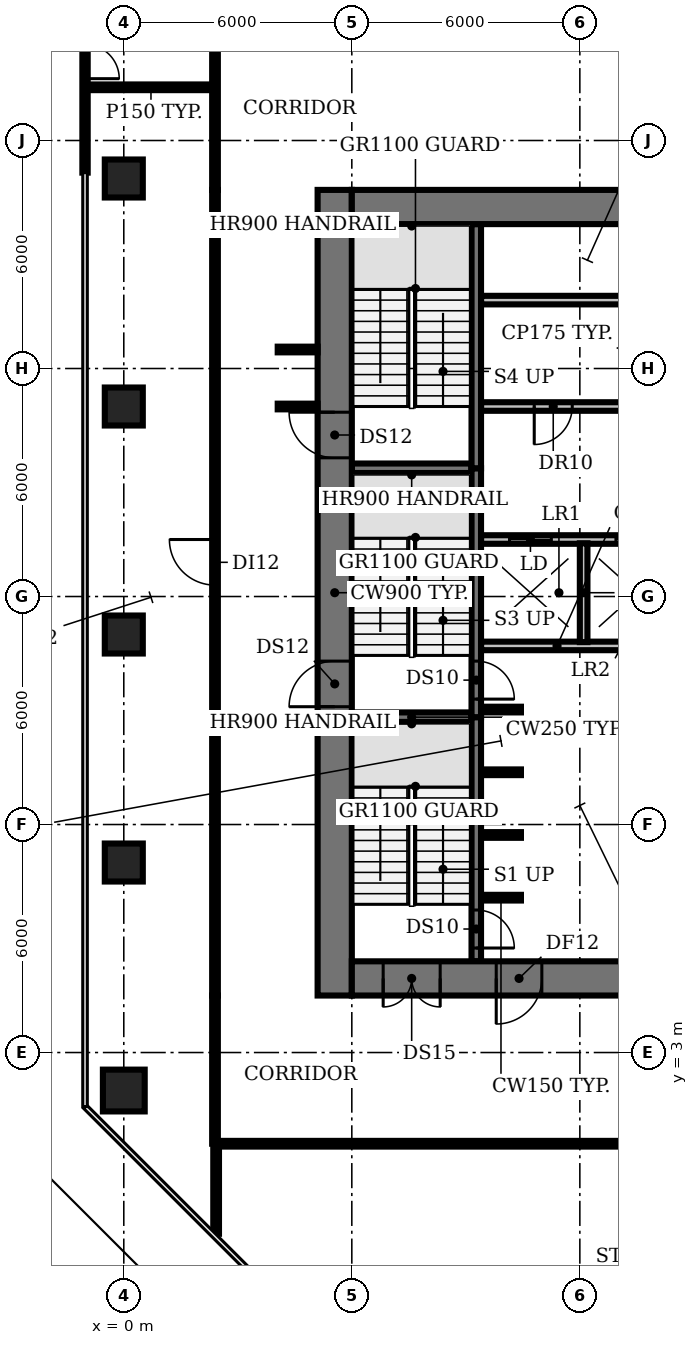
"""IFC4 building model, lengths in metres.
Left out: names, types, materials, properties, quantities, classifications, styles, units other than length and angle.
Written with IfcOpenShell. Run it as: python <this file> out.ifc"""

import sys

from ifc_helpers import new_model, si_unit, direction, frame, frame_2d, origin, origin_2d, place, context, subcontext, project, spatial, rectangle, circle, extrude, element, fill, save


model = new_model("IFC4")
c1 = context("Model", 3, precision=1e-05, world=origin(), true_north=direction((0.0, 1.0)))
c2 = subcontext(c1, "Body", "Model", "MODEL_VIEW")
j1 = project(units=[si_unit("LENGTHUNIT", "METRE"), si_unit("PLANEANGLEUNIT", "RADIAN")], contexts=[c1])
p1 = place(None, origin())
s1 = spatial("IfcSite", under=j1, at=p1, CompositionType="ELEMENT")
p2 = place(p1, origin())
s2 = spatial("IfcBuilding", under=s1, at=p2, CompositionType="ELEMENT")
p3 = place(p2, frame((0.0, 0.0, 11.0)))
s3 = spatial("IfcBuildingStorey", under=s2, at=p3, CompositionType="ELEMENT", Elevation=11.0)
p4 = place(p3, frame((0.0, 2.0, 0.0), z_axis=(0.0, 0.0, 1.0), x_axis=(1.0, 0.0, 0.0)))
e1 = element("IfcColumn", 1, at=p4, inside=s3, PredefinedType="COLUMN", context=c2, shape_type="SweptSolid", body=[
    extrude(circle(Radius=0.55, at=origin_2d()), origin(), (0.0, 0.0, 1.0), 4.15),
])
for number, where, z_axis, x_axis in (
    (2, (0.0, 8.0, 0.0), (0.0, 0.0, 1.0), (1.0, 0.0, 0.0)),
    (3, (0.0, 14.0, 0.0), (0.0, 0.0, 1.0), (1.0, 0.0, 0.0)),
    (4, (0.0, 20.0, 0.0), (0.0, 0.0, 1.0), (1.0, 0.0, 0.0)),
    (5, (0.0, 26.0, 0.0), (0.0, 0.0, 1.0), (1.0, 0.0, 0.0)),
):
    element("IfcColumn", number, at=place(p3, frame(where, z_axis=z_axis, x_axis=x_axis)), inside=s3, PredefinedType="COLUMN", context=c2, shape_type="SweptSolid", body=[
        extrude(rectangle(XDim=1.0, YDim=1.0, at=origin_2d()), origin(), (0.0, 0.0, 1.0), 4.15),
    ])
p5 = place(p3, frame((-1.02, 32.299, 0.0), z_axis=(0.0, 0.0, 1.0), x_axis=(0.0, -1.0, 0.0)))
e6 = element("IfcWall", 6, at=p5, inside=s3, PredefinedType="SOLIDWALL", context=c2, shape_type="SweptSolid", body=[
    extrude(rectangle(XDim=6.144, YDim=0.14, at=frame_2d((3.072, 0.0))), origin(), (0.0, 0.0, 1.0), 4.15),
])
p6 = place(p5, frame((1.872, 0.0, 0.0)))
e7 = element("IfcOpeningElement", 7, at=p6, cuts=e6, PredefinedType="OPENING", context=c2, shape_type="SweptSolid", body=[
    extrude(rectangle(XDim=1.8, YDim=2.4, at=frame_2d((0.9, 1.2))), frame((0.0, 0.08, 0.0), z_axis=(0.0, -1.0, 0.0), x_axis=(1.0, 0.0, 0.0)), (0.0, 0.0, 1.0), 0.16),
])
for number, where, z_axis, x_axis in (
    (8, (9.4, 7.075, 0.0), (0.0, 0.0, 1.0), (1.0, 0.0, 0.0)),
    (9, (9.4, 8.725, 0.0), (0.0, 0.0, 1.0), (1.0, 0.0, 0.0)),
    (10, (9.4, 10.375, 0.0), (0.0, 0.0, 1.0), (1.0, 0.0, 0.0)),
):
    element("IfcWall", number, at=place(p3, frame(where, z_axis=z_axis, x_axis=x_axis)), inside=s3, PredefinedType="SHEAR", context=c2, shape_type="SweptSolid", body=[
        extrude(rectangle(XDim=1.05, YDim=0.15, at=frame_2d((0.525, 0.0))), origin(), (0.0, 0.0, 1.0), 4.15),
    ])
p7 = place(p3, frame((6.0, 11.825, 0.0), z_axis=(0.0, 0.0, 1.0), x_axis=(1.0, 0.0, 0.0)))
e11 = element("IfcWall", 11, at=p7, inside=s3, PredefinedType="SHEAR", context=c2, shape_type="SweptSolid", body=[
    extrude(rectangle(XDim=3.15, YDim=0.25, at=frame_2d((1.575, 0.0))), origin(), (0.0, 0.0, 1.0), 4.15),
])
p8 = place(p3, frame((9.4, 12.025, 0.0), z_axis=(0.0, 0.0, 1.0), x_axis=(1.0, 0.0, 0.0)))
e12 = element("IfcWall", 12, at=p8, inside=s3, PredefinedType="SHEAR", context=c2, shape_type="SweptSolid", body=[
    extrude(rectangle(XDim=1.05, YDim=0.15, at=frame_2d((0.525, 0.0))), origin(), (0.0, 0.0, 1.0), 4.15),
])
p9 = place(p3, frame((9.4, 13.7, 0.0), z_axis=(0.0, 0.0, 1.0), x_axis=(1.0, 0.0, 0.0)))
e13 = element("IfcWall", 13, at=p9, inside=s3, PredefinedType="PARTITIONING", context=c2, shape_type="SweptSolid", body=[
    extrude(rectangle(XDim=4.0, YDim=0.225, at=frame_2d((2.0, 0.0))), origin(), (0.0, 0.0, 1.0), 4.15),
])
p10 = place(p3, frame((9.4, 16.5, 0.0), z_axis=(0.0, 0.0, 1.0), x_axis=(1.0, 0.0, 0.0)))
e14 = element("IfcWall", 14, at=p10, inside=s3, PredefinedType="PARTITIONING", context=c2, shape_type="SweptSolid", body=[
    extrude(rectangle(XDim=14.6, YDim=0.225, at=frame_2d((7.3, 0.0))), origin(), (0.0, 0.0, 1.0), 4.15),
])
p11 = place(p10, frame((0.75, 0.0, 0.0)))
e15 = element("IfcOpeningElement", 15, at=p11, cuts=e14, PredefinedType="OPENING", context=c2, shape_type="SweptSolid", body=[
    extrude(rectangle(XDim=1.1, YDim=2.1, at=frame_2d((0.55, 1.05))), frame((0.0, 0.123, 0.0), z_axis=(0.0, -1.0, 0.0), x_axis=(1.0, 0.0, 0.0)), (0.0, 0.0, 1.0), 0.245),
])
p12 = place(p10, frame((3.55, 0.0, 0.0)))
e16 = element("IfcOpeningElement", 16, at=p12, cuts=e14, PredefinedType="OPENING", context=c2, shape_type="SweptSolid", body=[
    extrude(rectangle(XDim=1.1, YDim=2.1, at=frame_2d((0.55, 1.05))), frame((0.0, 0.123, 0.0), z_axis=(0.0, -1.0, 0.0), x_axis=(1.0, 0.0, 0.0)), (0.0, 0.0, 1.0), 0.245),
])
p13 = place(p10, frame((6.35, 0.0, 0.0)))
e17 = element("IfcOpeningElement", 17, at=p13, cuts=e14, PredefinedType="OPENING", context=c2, shape_type="SweptSolid", body=[
    extrude(rectangle(XDim=1.1, YDim=2.1, at=frame_2d((0.55, 1.05))), frame((0.0, 0.123, 0.0), z_axis=(0.0, -1.0, 0.0), x_axis=(1.0, 0.0, 0.0)), (0.0, 0.0, 1.0), 0.245),
])
p14 = place(p10, frame((9.15, 0.0, 0.0)))
e18 = element("IfcOpeningElement", 18, at=p14, cuts=e14, PredefinedType="OPENING", context=c2, shape_type="SweptSolid", body=[
    extrude(rectangle(XDim=1.1, YDim=2.1, at=frame_2d((0.55, 1.05))), frame((0.0, 0.123, 0.0), z_axis=(0.0, -1.0, 0.0), x_axis=(1.0, 0.0, 0.0)), (0.0, 0.0, 1.0), 0.245),
])
p15 = place(p10, frame((12.4, 0.0, 0.0)))
e19 = element("IfcOpeningElement", 19, at=p15, cuts=e14, PredefinedType="OPENING", context=c2, shape_type="SweptSolid", body=[
    extrude(rectangle(XDim=1.0, YDim=2.1, at=frame_2d((0.5, 1.05))), frame((0.0, 0.123, 0.0), z_axis=(0.0, -1.0, 0.0), x_axis=(1.0, 0.0, 0.0)), (0.0, 0.0, 1.0), 0.245),
])
p16 = place(p3, frame((6.0, 18.375, 0.0), z_axis=(0.0, 0.0, 1.0), x_axis=(1.0, 0.0, 0.0)))
e20 = element("IfcWall", 20, at=p16, inside=s3, PredefinedType="SHEAR", context=c2, shape_type="SweptSolid", body=[
    extrude(rectangle(XDim=3.15, YDim=0.25, at=frame_2d((1.575, 0.0))), origin(), (0.0, 0.0, 1.0), 4.15),
])
p17 = place(p3, frame((24.0, 20.0, 0.0), z_axis=(0.0, 0.0, 1.0), x_axis=(-1.0, 0.0, 0.0)))
e21 = element("IfcWall", 21, at=p17, inside=s3, PredefinedType="PARTITIONING", context=c2, shape_type="SweptSolid", body=[
    extrude(rectangle(XDim=14.6, YDim=0.225, at=frame_2d((7.3, 0.0))), origin(), (0.0, 0.0, 1.0), 4.15),
])
p18 = place(p17, frame((12.2, 0.0, 0.0)))
e22 = element("IfcOpeningElement", 22, at=p18, cuts=e21, PredefinedType="OPENING", context=c2, shape_type="SweptSolid", body=[
    extrude(rectangle(XDim=1.0, YDim=2.1, at=frame_2d((0.5, 1.05))), frame((0.0, 0.123, 0.0), z_axis=(0.0, -1.0, 0.0), x_axis=(1.0, 0.0, 0.0)), (0.0, 0.0, 1.0), 0.245),
])
p19 = place(p17, frame((9.025, 0.0, 0.0)))
e23 = element("IfcOpeningElement", 23, at=p19, cuts=e21, PredefinedType="OPENING", context=c2, shape_type="SweptSolid", body=[
    extrude(rectangle(XDim=0.9, YDim=2.1, at=frame_2d((0.45, 1.05))), frame((0.0, 0.123, 0.0), z_axis=(0.0, -1.0, 0.0), x_axis=(1.0, 0.0, 0.0)), (0.0, 0.0, 1.0), 0.245),
])
p20 = place(p17, frame((5.375, 0.0, 0.0)))
e24 = element("IfcOpeningElement", 24, at=p20, cuts=e21, PredefinedType="OPENING", context=c2, shape_type="SweptSolid", body=[
    extrude(rectangle(XDim=1.0, YDim=2.1, at=frame_2d((0.5, 1.05))), frame((0.0, 0.123, 0.0), z_axis=(0.0, -1.0, 0.0), x_axis=(1.0, 0.0, 0.0)), (0.0, 0.0, 1.0), 0.245),
])
p21 = place(p17, frame((1.2, 0.0, 0.0)))
e25 = element("IfcOpeningElement", 25, at=p21, cuts=e21, PredefinedType="OPENING", context=c2, shape_type="SweptSolid", body=[
    extrude(rectangle(XDim=1.0, YDim=2.1, at=frame_2d((0.5, 1.05))), frame((0.0, 0.123, 0.0), z_axis=(0.0, -1.0, 0.0), x_axis=(1.0, 0.0, 0.0)), (0.0, 0.0, 1.0), 0.245),
])
p22 = place(p3, frame((9.4, 22.8, 0.0), z_axis=(0.0, 0.0, 1.0), x_axis=(1.0, 0.0, 0.0)))
e26 = element("IfcWall", 26, at=p22, inside=s3, PredefinedType="PARTITIONING", context=c2, shape_type="SweptSolid", body=[
    extrude(rectangle(XDim=14.6, YDim=0.225, at=frame_2d((7.3, 0.0))), origin(), (0.0, 0.0, 1.0), 4.15),
])
p23 = place(p3, frame((9.275, 11.825, 0.0), z_axis=(0.0, 0.0, 1.0), x_axis=(0.0, -1.0, 0.0)))
e27 = element("IfcWall", 27, at=p23, inside=s3, PredefinedType="SHEAR", context=c2, shape_type="SweptSolid", body=[
    extrude(rectangle(XDim=6.425, YDim=0.25, at=frame_2d((3.212, 0.0))), origin(), (0.0, 0.0, 1.0), 4.15),
])
p24 = place(p23, frame((5.075, 0.0, 0.0)))
e28 = element("IfcOpeningElement", 28, at=p24, cuts=e27, PredefinedType="OPENING", context=c2, shape_type="SweptSolid", body=[
    extrude(rectangle(XDim=1.0, YDim=2.1, at=frame_2d((0.5, 1.05))), frame((0.0, 0.135, 0.0), z_axis=(0.0, -1.0, 0.0), x_axis=(1.0, 0.0, 0.0)), (0.0, 0.0, 1.0), 0.27),
])
p25 = place(p3, frame((9.275, 18.375, 0.0), z_axis=(0.0, 0.0, 1.0), x_axis=(0.0, -1.0, 0.0)))
e29 = element("IfcWall", 29, at=p25, inside=s3, PredefinedType="SHEAR", context=c2, shape_type="SweptSolid", body=[
    extrude(rectangle(XDim=6.55, YDim=0.25, at=frame_2d((3.275, 0.0))), origin(), (0.0, 0.0, 1.0), 4.15),
])
p26 = place(p25, frame((5.075, 0.0, 0.0)))
e30 = element("IfcOpeningElement", 30, at=p26, cuts=e29, PredefinedType="OPENING", context=c2, shape_type="SweptSolid", body=[
    extrude(rectangle(XDim=1.0, YDim=2.1, at=frame_2d((0.5, 1.05))), frame((0.0, 0.135, 0.0), z_axis=(0.0, -1.0, 0.0), x_axis=(1.0, 0.0, 0.0)), (0.0, 0.0, 1.0), 0.27),
])
p27 = place(p3, frame((9.275, 18.375, 0.0), z_axis=(0.0, 0.0, 1.0), x_axis=(0.0, 1.0, 0.0)))
e31 = element("IfcWall", 31, at=p27, inside=s3, PredefinedType="SHEAR", context=c2, shape_type="SweptSolid", body=[
    extrude(rectangle(XDim=6.425, YDim=0.25, at=frame_2d((3.212, 0.0))), origin(), (0.0, 0.0, 1.0), 4.15),
])
p28 = place(p3, frame((12.1, 13.8, 0.0), z_axis=(0.0, 0.0, 1.0), x_axis=(0.0, 1.0, 0.0)))
e32 = element("IfcWall", 32, at=p28, inside=s3, PredefinedType="SOLIDWALL", context=c2, shape_type="SweptSolid", body=[
    extrude(rectangle(XDim=2.6, YDim=0.2, at=frame_2d((1.3, 0.0))), origin(), (0.0, 0.0, 1.0), 4.15),
])
p29 = place(p3, frame((5.55, 4.5, 0.0), z_axis=(0.0, 0.0, 1.0), x_axis=(0.0, 1.0, 0.0)))
e33 = element("IfcWall", 33, at=p29, inside=s3, PredefinedType="SHEAR", context=c2, shape_type="SweptSolid", body=[
    extrude(rectangle(XDim=21.2, YDim=0.9, at=frame_2d((10.6, 0.0))), origin(), (0.0, 0.0, 1.0), 4.15),
])
p30 = place(p29, frame((7.6, 0.0, 0.0)))
e34 = element("IfcOpeningElement", 34, at=p30, cuts=e33, PredefinedType="OPENING", context=c2, shape_type="SweptSolid", body=[
    extrude(rectangle(XDim=1.2, YDim=2.1, at=frame_2d((0.6, 1.05))), frame((0.0, 0.46, 0.0), z_axis=(0.0, -1.0, 0.0), x_axis=(1.0, 0.0, 0.0)), (0.0, 0.0, 1.0), 0.92),
])
p31 = place(p29, frame((14.15, 0.0, 0.0)))
e35 = element("IfcOpeningElement", 35, at=p31, cuts=e33, PredefinedType="OPENING", context=c2, shape_type="SweptSolid", body=[
    extrude(rectangle(XDim=1.2, YDim=2.1, at=frame_2d((0.6, 1.05))), frame((0.0, 0.46, 0.0), z_axis=(0.0, -1.0, 0.0), x_axis=(1.0, 0.0, 0.0)), (0.0, 0.0, 1.0), 0.92),
])
p32 = place(p3, frame((24.0, 4.95, 0.0), z_axis=(0.0, 0.0, 1.0), x_axis=(-1.0, 0.0, 0.0)))
e36 = element("IfcWall", 36, at=p32, inside=s3, PredefinedType="SHEAR", context=c2, shape_type="SweptSolid", body=[
    extrude(rectangle(XDim=18.0, YDim=0.9, at=frame_2d((9.0, 0.0))), origin(), (0.0, 0.0, 1.0), 4.15),
])
p33 = place(p32, frame((15.675, 0.0, 0.0)))
e37 = element("IfcOpeningElement", 37, at=p33, cuts=e36, PredefinedType="OPENING", context=c2, shape_type="SweptSolid", body=[
    extrude(rectangle(XDim=1.5, YDim=2.1, at=frame_2d((0.75, 1.05))), frame((0.0, 0.46, 0.0), z_axis=(0.0, -1.0, 0.0), x_axis=(1.0, 0.0, 0.0)), (0.0, 0.0, 1.0), 0.92),
])
p34 = place(p32, frame((0.825, 0.0, 0.0)))
e38 = element("IfcOpeningElement", 38, at=p34, cuts=e36, PredefinedType="OPENING", context=c2, shape_type="SweptSolid", body=[
    extrude(rectangle(XDim=1.5, YDim=2.1, at=frame_2d((0.75, 1.05))), frame((0.0, 0.46, 0.0), z_axis=(0.0, -1.0, 0.0), x_axis=(1.0, 0.0, 0.0)), (0.0, 0.0, 1.0), 0.92),
])
p35 = place(p32, frame((13.0, 0.0, 0.0)))
e39 = element("IfcOpeningElement", 39, at=p35, cuts=e36, PredefinedType="OPENING", context=c2, shape_type="SweptSolid", body=[
    extrude(rectangle(XDim=1.2, YDim=2.1, at=frame_2d((0.6, 1.05))), frame((0.0, 0.46, 0.0), z_axis=(0.0, -1.0, 0.0), x_axis=(1.0, 0.0, 0.0)), (0.0, 0.0, 1.0), 0.92),
])
p36 = place(p32, frame((4.9, 0.0, 0.0)))
e40 = element("IfcOpeningElement", 40, at=p36, cuts=e36, PredefinedType="OPENING", context=c2, shape_type="SweptSolid", body=[
    extrude(rectangle(XDim=1.0, YDim=2.1, at=frame_2d((0.5, 1.05))), frame((0.0, 0.46, 0.0), z_axis=(0.0, -1.0, 0.0), x_axis=(1.0, 0.0, 0.0)), (0.0, 0.0, 1.0), 0.92),
])
p37 = place(p3, frame((6.0, 25.25, 0.0), z_axis=(0.0, 0.0, 1.0), x_axis=(1.0, 0.0, 0.0)))
e41 = element("IfcWall", 41, at=p37, inside=s3, PredefinedType="SHEAR", context=c2, shape_type="SweptSolid", body=[
    extrude(rectangle(XDim=18.0, YDim=0.9, at=frame_2d((9.0, 0.0))), origin(), (0.0, 0.0, 1.0), 4.15),
])
p38 = place(p3, frame((-0.97, 28.4, 0.0), z_axis=(0.0, 0.0, 1.0), x_axis=(1.0, 0.0, 0.0)))
e42 = element("IfcWall", 42, at=p38, inside=s3, PredefinedType="PARTITIONING", context=c2, shape_type="SweptSolid", body=[
    extrude(rectangle(XDim=3.37, YDim=0.15, at=frame_2d((1.685, 0.0))), origin(), (0.0, 0.0, 1.0), 3.08),
])
p39 = place(p3, frame((2.4, 0.6, 0.0), z_axis=(0.0, 0.0, 1.0), x_axis=(0.0, 1.0, 0.0)))
e43 = element("IfcWall", 43, at=p39, inside=s3, PredefinedType="PARTITIONING", context=c2, shape_type="SweptSolid", body=[
    extrude(rectangle(XDim=3.9, YDim=0.15, at=frame_2d((1.95, 0.0))), origin(), (0.0, 0.0, 1.0), 3.08),
])
p40 = place(p3, frame((2.4, 4.5, 0.0), z_axis=(0.0, 0.0, 1.0), x_axis=(0.0, 1.0, 0.0)))
e44 = element("IfcWall", 44, at=p40, inside=s3, PredefinedType="PARTITIONING", context=c2, shape_type="SweptSolid", body=[
    extrude(rectangle(XDim=21.2, YDim=0.15, at=frame_2d((10.6, 0.0))), origin(), (0.0, 0.0, 1.0), 3.08),
])
p41 = place(p40, frame((10.8, 0.0, 0.0)))
e45 = element("IfcOpeningElement", 45, at=p41, cuts=e44, PredefinedType="OPENING", context=c2, shape_type="SweptSolid", body=[
    extrude(rectangle(XDim=1.2, YDim=2.1, at=frame_2d((0.6, 1.05))), frame((0.0, 0.085, 0.0), z_axis=(0.0, -1.0, 0.0), x_axis=(1.0, 0.0, 0.0)), (0.0, 0.0, 1.0), 0.17),
])
p42 = place(p3, frame((2.4, 25.7, 0.0), z_axis=(0.0, 0.0, 1.0), x_axis=(0.0, 1.0, 0.0)))
e46 = element("IfcWall", 46, at=p42, inside=s3, PredefinedType="PARTITIONING", context=c2, shape_type="SweptSolid", body=[
    extrude(rectangle(XDim=3.9, YDim=0.15, at=frame_2d((1.95, 0.0))), origin(), (0.0, 0.0, 1.0), 3.08),
])
p43 = place(p3, frame((2.43, -1.77, 0.0), z_axis=(0.0, 0.0, 1.0), x_axis=(0.0, 1.0, 0.0)))
e47 = element("IfcWall", 47, at=p43, inside=s3, PredefinedType="PARTITIONING", context=c2, shape_type="SweptSolid", body=[
    extrude(rectangle(XDim=2.37, YDim=0.15, at=frame_2d((1.185, 0.0))), origin(), (0.0, 0.0, 1.0), 3.08),
])
for number, where, z_axis, x_axis in (
    (48, (4.05, 20.0, 0.0), (0.0, 0.0, 1.0), (1.0, 0.0, 0.0)),
    (49, (4.05, 21.5, 0.0), (0.0, 0.0, 1.0), (1.0, 0.0, 0.0)),
):
    element("IfcWall", number, at=place(p3, frame(where, z_axis=z_axis, x_axis=x_axis)), inside=s3, PredefinedType="PARTITIONING", context=c2, shape_type="SweptSolid", body=[
        extrude(rectangle(XDim=1.05, YDim=0.15, at=frame_2d((0.525, 0.0))), origin(), (0.0, 0.0, 1.0), 3.08),
    ])
p44 = place(p3, frame((27.6, 0.6, 0.0), z_axis=(0.0, 0.0, 1.0), x_axis=(-1.0, 0.0, 0.0)))
e50 = element("IfcWall", 50, at=p44, inside=s3, PredefinedType="PARTITIONING", context=c2, shape_type="SweptSolid", body=[
    extrude(rectangle(XDim=25.2, YDim=0.15, at=frame_2d((12.6, 0.0))), origin(), (0.0, 0.0, 1.0), 3.08),
])
p45 = place(p44, frame((12.1, 0.0, 0.0)))
e51 = element("IfcOpeningElement", 51, at=p45, cuts=e50, PredefinedType="OPENING", context=c2, shape_type="SweptSolid", body=[
    extrude(rectangle(XDim=1.2, YDim=2.1, at=frame_2d((0.6, 1.05))), frame((0.0, 0.085, 0.0), z_axis=(0.0, -1.0, 0.0), x_axis=(1.0, 0.0, 0.0)), (0.0, 0.0, 1.0), 0.17),
])
p46 = place(p6, origin())
e52 = element("IfcDoor", 52, at=p46, inside=s3, OperationType="DOUBLE_DOOR_DOUBLE_SWING", PredefinedType="DOOR", context=c2, shape_type="SweptSolid", body=[
    extrude(rectangle(XDim=1.8, YDim=2.4, at=frame_2d((0.9, 1.2))), frame((0.0, 0.025, 0.0), z_axis=(0.0, -1.0, 0.0), x_axis=(1.0, 0.0, 0.0)), (0.0, 0.0, 1.0), 0.05),
])
fill(e7, e52)
p47 = place(p11, origin())
e53 = element("IfcDoor", 53, at=p47, inside=s3, OperationType="DOUBLE_DOOR_SLIDING", PredefinedType="DOOR", context=c2, shape_type="SweptSolid", body=[
    extrude(rectangle(XDim=1.1, YDim=2.1, at=frame_2d((0.55, 1.05))), frame((0.0, 0.025, 0.0), z_axis=(0.0, -1.0, 0.0), x_axis=(1.0, 0.0, 0.0)), (0.0, 0.0, 1.0), 0.05),
])
fill(e15, e53)
p48 = place(p12, origin())
e54 = element("IfcDoor", 54, at=p48, inside=s3, OperationType="DOUBLE_DOOR_SLIDING", PredefinedType="DOOR", context=c2, shape_type="SweptSolid", body=[
    extrude(rectangle(XDim=1.1, YDim=2.1, at=frame_2d((0.55, 1.05))), frame((0.0, 0.025, 0.0), z_axis=(0.0, -1.0, 0.0), x_axis=(1.0, 0.0, 0.0)), (0.0, 0.0, 1.0), 0.05),
])
fill(e16, e54)
p49 = place(p18, origin())
e55 = element("IfcDoor", 55, at=p49, inside=s3, OperationType="SINGLE_SWING_RIGHT", PredefinedType="DOOR", context=c2, shape_type="SweptSolid", body=[
    extrude(rectangle(XDim=1.0, YDim=2.1, at=frame_2d((0.5, 1.05))), frame((0.0, 0.025, 0.0), z_axis=(0.0, -1.0, 0.0), x_axis=(1.0, 0.0, 0.0)), (0.0, 0.0, 1.0), 0.05),
])
fill(e22, e55)
p50 = place(p24, origin())
e56 = element("IfcDoor", 56, at=p50, inside=s3, OperationType="SINGLE_SWING_RIGHT", PredefinedType="DOOR", context=c2, shape_type="SweptSolid", body=[
    extrude(rectangle(XDim=1.0, YDim=2.1, at=frame_2d((0.5, 1.05))), frame((0.0, 0.025, 0.0), z_axis=(0.0, -1.0, 0.0), x_axis=(1.0, 0.0, 0.0)), (0.0, 0.0, 1.0), 0.05),
])
fill(e28, e56)
p51 = place(p26, origin())
e57 = element("IfcDoor", 57, at=p51, inside=s3, OperationType="SINGLE_SWING_RIGHT", PredefinedType="DOOR", context=c2, shape_type="SweptSolid", body=[
    extrude(rectangle(XDim=1.0, YDim=2.1, at=frame_2d((0.5, 1.05))), frame((0.0, 0.025, 0.0), z_axis=(0.0, -1.0, 0.0), x_axis=(1.0, 0.0, 0.0)), (0.0, 0.0, 1.0), 0.05),
])
fill(e30, e57)
p52 = place(p30, origin())
e58 = element("IfcDoor", 58, at=p52, inside=s3, OperationType="SINGLE_SWING_LEFT", PredefinedType="DOOR", context=c2, shape_type="SweptSolid", body=[
    extrude(rectangle(XDim=1.2, YDim=2.1, at=frame_2d((0.6, 1.05))), frame((0.0, 0.025, 0.0), z_axis=(0.0, -1.0, 0.0), x_axis=(1.0, 0.0, 0.0)), (0.0, 0.0, 1.0), 0.05),
])
fill(e34, e58)
p53 = place(p31, origin())
e59 = element("IfcDoor", 59, at=p53, inside=s3, OperationType="SINGLE_SWING_RIGHT", PredefinedType="DOOR", context=c2, shape_type="SweptSolid", body=[
    extrude(rectangle(XDim=1.2, YDim=2.1, at=frame_2d((0.6, 1.05))), frame((0.0, 0.025, 0.0), z_axis=(0.0, -1.0, 0.0), x_axis=(1.0, 0.0, 0.0)), (0.0, 0.0, 1.0), 0.05),
])
fill(e35, e59)
p54 = place(p33, origin())
e60 = element("IfcDoor", 60, at=p54, inside=s3, OperationType="DOUBLE_DOOR_SINGLE_SWING", PredefinedType="DOOR", context=c2, shape_type="SweptSolid", body=[
    extrude(rectangle(XDim=1.5, YDim=2.1, at=frame_2d((0.75, 1.05))), frame((0.0, 0.025, 0.0), z_axis=(0.0, -1.0, 0.0), x_axis=(1.0, 0.0, 0.0)), (0.0, 0.0, 1.0), 0.05),
])
fill(e37, e60)
p55 = place(p35, origin())
e61 = element("IfcDoor", 61, at=p55, inside=s3, OperationType="SINGLE_SWING_RIGHT", PredefinedType="DOOR", context=c2, shape_type="SweptSolid", body=[
    extrude(rectangle(XDim=1.2, YDim=2.1, at=frame_2d((0.6, 1.05))), frame((0.0, 0.025, 0.0), z_axis=(0.0, -1.0, 0.0), x_axis=(1.0, 0.0, 0.0)), (0.0, 0.0, 1.0), 0.05),
])
fill(e39, e61)
p56 = place(p41, origin())
e62 = element("IfcDoor", 62, at=p56, inside=s3, OperationType="SINGLE_SWING_RIGHT", PredefinedType="DOOR", context=c2, shape_type="SweptSolid", body=[
    extrude(rectangle(XDim=1.2, YDim=2.1, at=frame_2d((0.6, 1.05))), frame((0.0, 0.025, 0.0), z_axis=(0.0, -1.0, 0.0), x_axis=(1.0, 0.0, 0.0)), (0.0, 0.0, 1.0), 0.05),
])
fill(e45, e62)
save(model, sys.argv[1])
